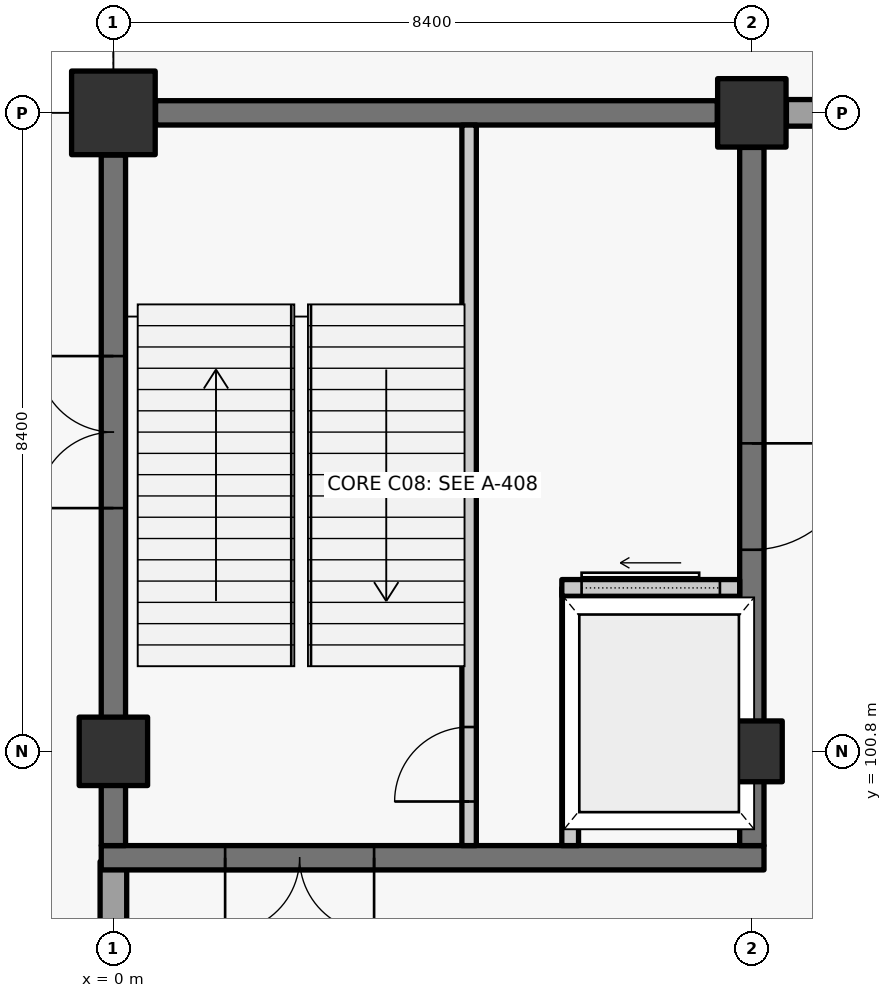
"""IFC4 building model, lengths in metres.
Left out: names, types, materials, properties, quantities, classifications, styles, units other than length and angle.
Written with IfcOpenShell. Run it as: python <this file> out.ifc"""

import sys

from ifc_helpers import new_model, si_unit, direction, frame, frame_2d, origin, origin_2d, place, context, subcontext, project, spatial, rectangle, extrude, element, fill, save


model = new_model("IFC4")
c1 = context("Model", 3, precision=1e-05, world=origin(), true_north=direction((0.0, 1.0)))
c2 = subcontext(c1, "Body", "Model", "MODEL_VIEW")
j1 = project(units=[si_unit("LENGTHUNIT", "METRE"), si_unit("PLANEANGLEUNIT", "RADIAN")], contexts=[c1])
p1 = place(None, origin())
s1 = spatial("IfcSite", under=j1, at=p1, CompositionType="ELEMENT")
p2 = place(p1, origin())
s2 = spatial("IfcBuilding", under=s1, at=p2, CompositionType="ELEMENT")
p3 = place(p2, origin())
s3 = spatial("IfcBuildingStorey", under=s2, at=p3, CompositionType="ELEMENT", Elevation=0.0)
p4 = place(p3, frame((0.0, 100.8, -0.36), z_axis=(0.0, 0.0, 1.0), x_axis=(1.0, 0.0, 0.0)))
e1 = element("IfcColumn", 1, at=p4, inside=s3, PredefinedType="COLUMN", context=c2, shape_type="SweptSolid", body=[
    extrude(rectangle(XDim=0.9, YDim=0.9, at=origin_2d()), origin(), (0.0, 0.0, 1.0), 6.36),
])
p5 = place(p3, frame((0.0, 109.2, -0.36), z_axis=(0.0, 0.0, 1.0), x_axis=(1.0, 0.0, 0.0)))
e2 = element("IfcColumn", 2, at=p5, inside=s3, PredefinedType="COLUMN", context=c2, shape_type="SweptSolid", body=[
    extrude(rectangle(XDim=1.1, YDim=1.1, at=origin_2d()), origin(), (0.0, 0.0, 1.0), 6.36),
])
p6 = place(p3, frame((8.4, 100.8, -0.36), z_axis=(0.0, 0.0, 1.0), x_axis=(1.0, 0.0, 0.0)))
e3 = element("IfcColumn", 3, at=p6, inside=s3, PredefinedType="COLUMN", context=c2, shape_type="SweptSolid", body=[
    extrude(rectangle(XDim=0.8, YDim=0.8, at=origin_2d()), origin(), (0.0, 0.0, 1.0), 6.36),
])
p7 = place(p3, frame((8.4, 109.2, -0.36), z_axis=(0.0, 0.0, 1.0), x_axis=(1.0, 0.0, 0.0)))
e4 = element("IfcColumn", 4, at=p7, inside=s3, PredefinedType="COLUMN", context=c2, shape_type="SweptSolid", body=[
    extrude(rectangle(XDim=0.9, YDim=0.9, at=origin_2d()), origin(), (0.0, 0.0, 1.0), 6.36),
])
p8 = place(p3, frame((0.0, 92.855, 0.0), z_axis=(0.0, 0.0, 1.0), x_axis=(0.0, 1.0, 0.0)))
e5 = element("IfcWall", 5, at=p8, inside=s3, PredefinedType="SOLIDWALL", context=c2, shape_type="SweptSolid", body=[
    extrude(rectangle(XDim=6.495, YDim=0.35, at=frame_2d((3.248, 0.0))), origin(), (0.0, 0.0, 1.0), 5.23),
])
p9 = place(p8, frame((2.06, 0.0, 0.0)))
e6 = element("IfcOpeningElement", 6, at=p9, cuts=e5, PredefinedType="OPENING", context=c2, shape_type="SweptSolid", body=[
    extrude(rectangle(XDim=2.4, YDim=2.6, at=frame_2d((1.2, 1.3))), frame((0.0, 0.185, 0.0), z_axis=(0.0, -1.0, 0.0), x_axis=(1.0, 0.0, 0.0)), (0.0, 0.0, 1.0), 0.37),
])
p10 = place(p3, frame((8.855, 109.2, 0.0), z_axis=(0.0, 0.0, 1.0), x_axis=(1.0, 0.0, 0.0)))
e7 = element("IfcWall", 7, at=p10, inside=s3, PredefinedType="SOLIDWALL", context=c2, shape_type="SweptSolid", body=[
    extrude(rectangle(XDim=7.49, YDim=0.35, at=frame_2d((3.745, 0.0))), origin(), (0.0, 0.0, 1.0), 5.19),
])
p11 = place(p10, frame((1.945, 0.0, 1.4)))
e8 = element("IfcOpeningElement", 8, at=p11, cuts=e7, PredefinedType="OPENING", context=c2, shape_type="SweptSolid", body=[
    extrude(rectangle(XDim=3.6, YDim=1.35, at=frame_2d((1.8, 0.675))), frame((0.0, 0.185, 0.0), z_axis=(0.0, -1.0, 0.0), x_axis=(1.0, 0.0, 0.0)), (0.0, 0.0, 1.0), 0.37),
])
p12 = place(p3, frame((8.56, 99.4, -0.36), z_axis=(0.0, 0.0, 1.0), x_axis=(-1.0, 0.0, 0.0)))
e9 = element("IfcWall", 9, at=p12, inside=s3, PredefinedType="SHEAR", context=c2, shape_type="SweptSolid", body=[
    extrude(rectangle(XDim=8.72, YDim=0.32, at=frame_2d((4.36, 0.0))), origin(), (0.0, 0.0, 1.0), 6.08),
])
p13 = place(p12, frame((5.13, 0.0, 0.36)))
e10 = element("IfcOpeningElement", 10, at=p13, cuts=e9, PredefinedType="OPENING", context=c2, shape_type="SweptSolid", body=[
    extrude(rectangle(XDim=1.96, YDim=2.2, at=frame_2d((0.98, 1.1))), frame((0.0, 0.17, 0.0), z_axis=(0.0, -1.0, 0.0), x_axis=(1.0, 0.0, 0.0)), (0.0, 0.0, 1.0), 0.34),
])
p14 = place(p3, frame((0.0, 99.56, -0.36), z_axis=(0.0, 0.0, 1.0), x_axis=(0.0, 1.0, 0.0)))
e11 = element("IfcWall", 11, at=p14, inside=s3, PredefinedType="SHEAR", context=c2, shape_type="SweptSolid", body=[
    extrude(rectangle(XDim=9.085, YDim=0.32, at=frame_2d((4.542, 0.0))), origin(), (0.0, 0.0, 1.0), 6.08),
])
p15 = place(p14, frame((4.44, 0.0, 0.36)))
e12 = element("IfcOpeningElement", 12, at=p15, cuts=e11, PredefinedType="OPENING", context=c2, shape_type="SweptSolid", body=[
    extrude(rectangle(XDim=2.0, YDim=2.28, at=frame_2d((1.0, 1.14))), frame((0.0, 0.17, 0.0), z_axis=(0.0, -1.0, 0.0), x_axis=(1.0, 0.0, 0.0)), (0.0, 0.0, 1.0), 0.34),
])
p16 = place(p3, frame((0.555, 109.2, -0.36), z_axis=(0.0, 0.0, 1.0), x_axis=(1.0, 0.0, 0.0)))
e13 = element("IfcWall", 13, at=p16, inside=s3, PredefinedType="SHEAR", context=c2, shape_type="SweptSolid", body=[
    extrude(rectangle(XDim=7.39, YDim=0.32, at=frame_2d((3.695, 0.0))), origin(), (0.0, 0.0, 1.0), 6.08),
])
p17 = place(p3, frame((8.4, 108.745, -0.36), z_axis=(0.0, 0.0, 1.0), x_axis=(0.0, -1.0, 0.0)))
e14 = element("IfcWall", 14, at=p17, inside=s3, PredefinedType="SHEAR", context=c2, shape_type="SweptSolid", body=[
    extrude(rectangle(XDim=9.185, YDim=0.32, at=frame_2d((4.593, 0.0))), origin(), (0.0, 0.0, 1.0), 6.08),
])
p18 = place(p17, frame((3.893, 0.0, 0.36)))
e15 = element("IfcOpeningElement", 15, at=p18, cuts=e14, PredefinedType="OPENING", context=c2, shape_type="SweptSolid", body=[
    extrude(rectangle(XDim=1.4, YDim=2.2, at=frame_2d((0.7, 1.1))), frame((0.0, 0.17, 0.0), z_axis=(0.0, -1.0, 0.0), x_axis=(1.0, 0.0, 0.0)), (0.0, 0.0, 1.0), 0.34),
])
p19 = place(p3, frame((4.68, 99.56, -0.36), z_axis=(0.0, 0.0, 1.0), x_axis=(0.0, 1.0, 0.0)))
e16 = element("IfcWall", 16, at=p19, inside=s3, PredefinedType="SOLIDWALL", context=c2, shape_type="SweptSolid", body=[
    extrude(rectangle(XDim=9.48, YDim=0.19, at=frame_2d((4.74, 0.0))), origin(), (0.0, 0.0, 1.0), 6.08),
])
p20 = place(p19, frame((0.58, 0.0, 0.36)))
e17 = element("IfcOpeningElement", 17, at=p20, cuts=e16, PredefinedType="OPENING", context=c2, shape_type="SweptSolid", body=[
    extrude(rectangle(XDim=0.98, YDim=2.15, at=frame_2d((0.49, 1.075))), frame((0.0, 0.105, 0.0), z_axis=(0.0, -1.0, 0.0), x_axis=(1.0, 0.0, 0.0)), (0.0, 0.0, 1.0), 0.21),
])
p21 = place(p3, frame((6.01, 99.56, 0.0), z_axis=(0.0, 0.0, 1.0), x_axis=(0.0, 1.0, 0.0)))
e18 = element("IfcWall", 18, at=p21, inside=s3, PredefinedType="SOLIDWALL", context=c2, shape_type="SweptSolid", body=[
    extrude(rectangle(XDim=3.39, YDim=0.22, at=frame_2d((1.695, 0.0))), origin(), (0.0, 0.0, 1.0), 5.72),
])
p22 = place(p3, frame((5.9, 102.95, 0.0), z_axis=(0.0, 0.0, 1.0), x_axis=(1.0, 0.0, 0.0)))
e19 = element("IfcWall", 19, at=p22, inside=s3, PredefinedType="SOLIDWALL", context=c2, shape_type="SweptSolid", body=[
    extrude(rectangle(XDim=2.34, YDim=0.22, at=frame_2d((1.17, 0.0))), origin(), (0.0, 0.0, 1.0), 5.72),
])
p23 = place(p22, frame((0.26, 0.0, 0.0)))
e20 = element("IfcOpeningElement", 20, at=p23, cuts=e19, PredefinedType="OPENING", context=c2, shape_type="SweptSolid", body=[
    extrude(rectangle(XDim=1.82, YDim=2.4, at=frame_2d((0.91, 1.2))), frame((0.0, 0.12, 0.0), z_axis=(0.0, -1.0, 0.0), x_axis=(1.0, 0.0, 0.0)), (0.0, 0.0, 1.0), 0.24),
])
p24 = place(p20, origin())
e21 = element("IfcDoor", 21, at=p24, inside=s3, OperationType="SINGLE_SWING_LEFT", PredefinedType="DOOR", context=c2, shape_type="SweptSolid", body=[
    extrude(rectangle(XDim=0.98, YDim=2.15, at=frame_2d((0.49, 1.075))), frame((0.0, 0.025, 0.0), z_axis=(0.0, -1.0, 0.0), x_axis=(1.0, 0.0, 0.0)), (0.0, 0.0, 1.0), 0.05),
])
fill(e17, e21)
p25 = place(p13, origin())
e22 = element("IfcDoor", 22, at=p25, inside=s3, OperationType="DOUBLE_DOOR_SINGLE_SWING", PredefinedType="DOOR", context=c2, shape_type="SweptSolid", body=[
    extrude(rectangle(XDim=1.96, YDim=2.2, at=frame_2d((0.98, 1.1))), frame((0.0, 0.025, 0.0), z_axis=(0.0, -1.0, 0.0), x_axis=(1.0, 0.0, 0.0)), (0.0, 0.0, 1.0), 0.05),
])
fill(e10, e22)
p26 = place(p18, origin())
e23 = element("IfcDoor", 23, at=p26, inside=s3, OperationType="SINGLE_SWING_LEFT", PredefinedType="DOOR", context=c2, shape_type="SweptSolid", body=[
    extrude(rectangle(XDim=1.4, YDim=2.2, at=frame_2d((0.7, 1.1))), frame((0.0, 0.025, 0.0), z_axis=(0.0, -1.0, 0.0), x_axis=(1.0, 0.0, 0.0)), (0.0, 0.0, 1.0), 0.05),
])
fill(e15, e23)
p27 = place(p15, origin())
e24 = element("IfcDoor", 24, at=p27, inside=s3, OperationType="DOUBLE_DOOR_SINGLE_SWING", PredefinedType="DOOR", context=c2, shape_type="SweptSolid", body=[
    extrude(rectangle(XDim=2.0, YDim=2.28, at=frame_2d((1.0, 1.14))), frame((0.0, 0.025, 0.0), z_axis=(0.0, -1.0, 0.0), x_axis=(1.0, 0.0, 0.0)), (0.0, 0.0, 1.0), 0.05),
])
fill(e12, e24)
p28 = place(p23, origin())
e25 = element("IfcDoor", 25, at=p28, inside=s3, OperationType="SLIDING_TO_LEFT", PredefinedType="DOOR", context=c2, shape_type="SweptSolid", body=[
    extrude(rectangle(XDim=1.82, YDim=2.4, at=frame_2d((0.91, 1.2))), frame((0.0, 0.025, 0.0), z_axis=(0.0, -1.0, 0.0), x_axis=(1.0, 0.0, 0.0)), (0.0, 0.0, 1.0), 0.05),
])
fill(e20, e25)
save(model, sys.argv[1])
